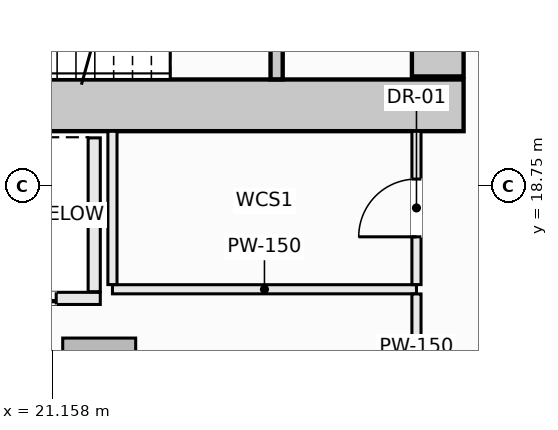
"""IFC4 building model, lengths in metres.
Left out: names, types, materials, properties, quantities, classifications, styles, units other than length and angle.
Written with IfcOpenShell. Run it as: python <this file> out.ifc"""

import sys

from ifc_helpers import new_model, si_unit, direction, frame, frame_2d, origin, origin_2d, place, context, subcontext, project, spatial, rectangle, extrude, element, fill, save


model = new_model("IFC4")
c1 = context("Model", 3, precision=1e-05, world=origin(), true_north=direction((0.0, 1.0)))
c2 = subcontext(c1, "Body", "Model", "MODEL_VIEW")
j1 = project(units=[si_unit("LENGTHUNIT", "METRE"), si_unit("PLANEANGLEUNIT", "RADIAN")], contexts=[c1])
p1 = place(None, origin())
s1 = spatial("IfcSite", under=j1, at=p1, CompositionType="ELEMENT")
p2 = place(p1, origin())
s2 = spatial("IfcBuilding", under=s1, at=p2, CompositionType="ELEMENT")
p3 = place(p2, frame((0.0, 0.0, 41.9)))
s3 = spatial("IfcBuildingStorey", under=s2, at=p3, CompositionType="ELEMENT", Elevation=41.9)
p4 = place(p3, frame((14.075, 20.075, -0.28), z_axis=(0.0, 0.0, 1.0), x_axis=(1.0, 0.0, 0.0)))
e1 = element("IfcWall", 1, at=p4, inside=s3, PredefinedType="SHEAR", context=c2, shape_type="SweptSolid", body=[
    extrude(rectangle(XDim=13.85, YDim=0.85, at=frame_2d((6.925, 0.0))), origin(), (0.0, 0.0, 1.0), 3.85),
])
p5 = place(p3, frame((27.5, 20.55, -0.28), z_axis=(0.0, 0.0, 1.0), x_axis=(0.0, 1.0, 0.0)))
e2 = element("IfcWall", 2, at=p5, inside=s3, PredefinedType="SHEAR", context=c2, shape_type="SweptSolid", body=[
    extrude(rectangle(XDim=1.5, YDim=0.85, at=frame_2d((0.75, 0.0))), origin(), (0.0, 0.0, 1.0), 3.85),
])
p6 = place(p3, frame((21.932, 15.648, -0.28), z_axis=(0.0, 0.0, 1.0), x_axis=(1.0, 0.0, 0.0)))
e3 = element("IfcColumn", 3, at=p6, inside=s3, PredefinedType="COLUMN", context=c2, shape_type="SweptSolid", body=[
    extrude(rectangle(XDim=1.2, YDim=1.2, at=origin_2d()), origin(), (0.0, 0.0, 1.0), 3.85),
])
p7 = place(p3, frame((24.85, 20.502, -0.28), z_axis=(0.0, 0.0, 1.0), x_axis=(0.0, 1.0, 0.0)))
e4 = element("IfcWall", 4, at=p7, inside=s3, PredefinedType="SHEAR", context=c2, shape_type="SweptSolid", body=[
    extrude(rectangle(XDim=3.038, YDim=0.2, at=frame_2d((1.519, 0.0))), origin(), (0.0, 0.0, 1.0), 3.85),
])
p8 = place(p7, frame((0.969, 0.0, 0.28)))
e5 = element("IfcOpeningElement", 5, at=p8, cuts=e4, PredefinedType="OPENING", context=c2, shape_type="SweptSolid", body=[
    extrude(rectangle(XDim=1.1, YDim=2.15, at=frame_2d((0.55, 1.075))), frame((0.0, 0.11, 0.0), z_axis=(0.0, -1.0, 0.0), x_axis=(1.0, 0.0, 0.0)), (0.0, 0.0, 1.0), 0.22),
])
p9 = place(p3, frame((19.4, 16.9, 0.0), z_axis=(0.0, 0.0, 1.0), x_axis=(1.0, 0.0, 0.0)))
e6 = element("IfcWall", 6, at=p9, inside=s3, PredefinedType="SOLIDWALL", context=c2, shape_type="SweptSolid", body=[
    extrude(rectangle(XDim=2.55, YDim=0.2, at=frame_2d((1.275, 0.0))), origin(), (0.0, 0.0, 1.0), 3.57),
])
p10 = place(p9, frame((0.725, 0.0, 0.0)))
e7 = element("IfcOpeningElement", 7, at=p10, cuts=e6, PredefinedType="OPENING", context=c2, shape_type="SweptSolid", body=[
    extrude(rectangle(XDim=1.1, YDim=2.2, at=frame_2d((0.55, 1.1))), frame((0.0, 0.11, 0.0), z_axis=(0.0, -1.0, 0.0), x_axis=(1.0, 0.0, 0.0)), (0.0, 0.0, 1.0), 0.22),
])
p11 = place(p3, frame((21.85, 17.01, 0.0), z_axis=(0.0, 0.0, 1.0), x_axis=(0.0, 1.0, 0.0)))
e8 = element("IfcWall", 8, at=p11, inside=s3, PredefinedType="SOLIDWALL", context=c2, shape_type="SweptSolid", body=[
    extrude(rectangle(XDim=2.53, YDim=0.2, at=frame_2d((1.265, 0.0))), origin(), (0.0, 0.0, 1.0), 3.57),
])
p12 = place(p3, frame((22.15, 17.05, 0.0), z_axis=(0.0, 0.0, 1.0), x_axis=(1.0, 0.0, 0.0)))
e9 = element("IfcWall", 9, at=p12, inside=s3, PredefinedType="PARTITIONING", context=c2, shape_type="SweptSolid", body=[
    extrude(rectangle(XDim=5.0, YDim=0.15, at=frame_2d((2.5, 0.0))), origin(), (0.0, 0.0, 1.0), 3.57),
])
p13 = place(p3, frame((22.15, 17.127, 0.0), z_axis=(0.0, 0.0, 1.0), x_axis=(0.0, 1.0, 0.0)))
e10 = element("IfcWall", 10, at=p13, inside=s3, PredefinedType="PARTITIONING", context=c2, shape_type="SweptSolid", body=[
    extrude(rectangle(XDim=2.521, YDim=0.15, at=frame_2d((1.26, 0.0))), origin(), (0.0, 0.0, 1.0), 3.57),
])
p14 = place(p3, frame((27.15, 13.85, 0.0), z_axis=(0.0, 0.0, 1.0), x_axis=(0.0, 1.0, 0.0)))
e11 = element("IfcWall", 11, at=p14, inside=s3, PredefinedType="PARTITIONING", context=c2, shape_type="SweptSolid", body=[
    extrude(rectangle(XDim=3.123, YDim=0.15, at=frame_2d((1.562, 0.0))), origin(), (0.0, 0.0, 1.0), 3.57),
])
p15 = place(p3, frame((27.15, 17.127, 0.0), z_axis=(0.0, 0.0, 1.0), x_axis=(0.0, 1.0, 0.0)))
e12 = element("IfcWall", 12, at=p15, inside=s3, PredefinedType="PARTITIONING", context=c2, shape_type="SweptSolid", body=[
    extrude(rectangle(XDim=2.521, YDim=0.15, at=frame_2d((1.26, 0.0))), origin(), (0.0, 0.0, 1.0), 3.57),
])
p16 = place(p15, frame((0.785, 0.0, 0.0)))
e13 = element("IfcOpeningElement", 13, at=p16, cuts=e12, PredefinedType="OPENING", context=c2, shape_type="SweptSolid", body=[
    extrude(rectangle(XDim=0.95, YDim=2.1, at=frame_2d((0.475, 1.05))), frame((0.0, 0.085, 0.0), z_axis=(0.0, -1.0, 0.0), x_axis=(1.0, 0.0, 0.0)), (0.0, 0.0, 1.0), 0.17),
])
p17 = place(p10, origin())
e14 = element("IfcDoor", 14, at=p17, inside=s3, OperationType="SLIDING_TO_LEFT", PredefinedType="DOOR", context=c2, shape_type="SweptSolid", body=[
    extrude(rectangle(XDim=1.1, YDim=2.2, at=frame_2d((0.55, 1.1))), frame((0.0, 0.025, 0.0), z_axis=(0.0, -1.0, 0.0), x_axis=(1.0, 0.0, 0.0)), (0.0, 0.0, 1.0), 0.05),
])
fill(e7, e14)
p18 = place(p16, origin())
e15 = element("IfcDoor", 15, at=p18, inside=s3, OperationType="SINGLE_SWING_LEFT", PredefinedType="DOOR", context=c2, shape_type="SweptSolid", body=[
    extrude(rectangle(XDim=0.95, YDim=2.1, at=frame_2d((0.475, 1.05))), frame((0.0, 0.025, 0.0), z_axis=(0.0, -1.0, 0.0), x_axis=(1.0, 0.0, 0.0)), (0.0, 0.0, 1.0), 0.05),
])
fill(e13, e15)
save(model, sys.argv[1])
